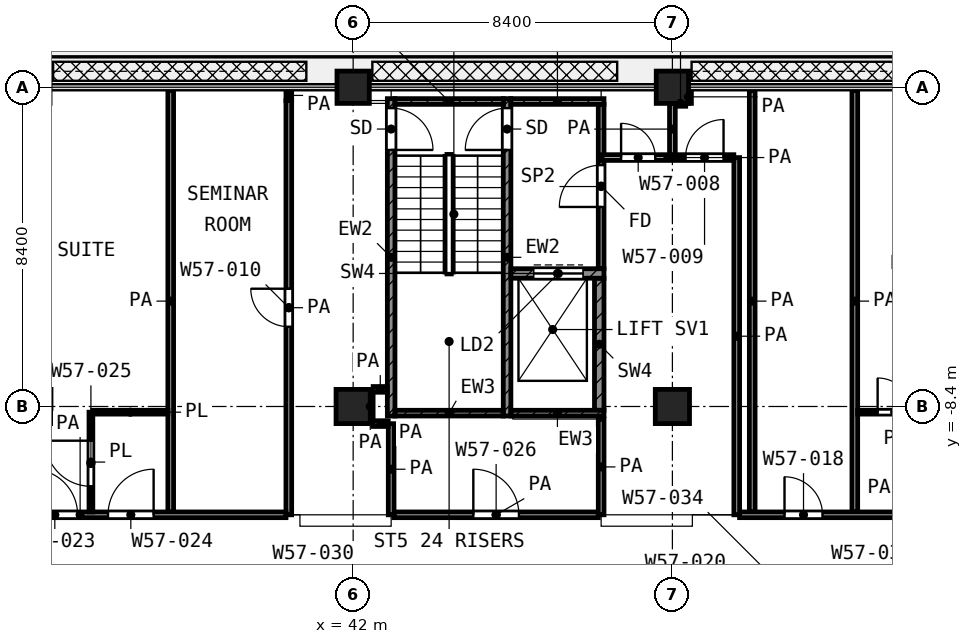
"""IFC4 building model, lengths in metres.
Left out: names, types, materials, properties, quantities, classifications, styles, units other than length and angle.
Written with IfcOpenShell. Run it as: python <this file> out.ifc"""

import sys

from ifc_helpers import new_model, si_unit, direction, frame, frame_2d, origin, origin_2d, place, context, subcontext, project, spatial, rectangle, extrude, element, fill, save


model = new_model("IFC4")
c1 = context("Model", 3, precision=1e-05, world=origin(), true_north=direction((0.0, 1.0)))
c2 = subcontext(c1, "Body", "Model", "MODEL_VIEW")
j1 = project(units=[si_unit("LENGTHUNIT", "METRE"), si_unit("PLANEANGLEUNIT", "RADIAN")], contexts=[c1])
p1 = place(None, origin())
s1 = spatial("IfcSite", under=j1, at=p1, CompositionType="ELEMENT")
p2 = place(p1, origin())
s2 = spatial("IfcBuilding", under=s1, at=p2, CompositionType="ELEMENT")
p3 = place(p2, frame((0.0, 0.0, 247.4)))
s3 = spatial("IfcBuildingStorey", under=s2, at=p3, CompositionType="ELEMENT", Elevation=247.4)
for number, where, z_axis, x_axis in (
    (1, (42.0, 0.0, 0.0), (0.0, 0.0, 1.0), (1.0, 0.0, 0.0)),
    (2, (50.4, 0.0, 0.0), (0.0, 0.0, 1.0), (1.0, 0.0, 0.0)),
):
    element("IfcColumn", number, at=place(p3, frame(where, z_axis=z_axis, x_axis=x_axis)), inside=s3, PredefinedType="COLUMN", context=c2, shape_type="SweptSolid", body=[
        extrude(rectangle(XDim=0.85, YDim=0.85, at=origin_2d()), origin(), (0.0, 0.0, 1.0), 4.2),
    ])
for number, where, z_axis, x_axis in (
    (3, (42.0, -8.4, 0.0), (0.0, 0.0, 1.0), (1.0, 0.0, 0.0)),
    (4, (50.4, -8.4, 0.0), (0.0, 0.0, 1.0), (1.0, 0.0, 0.0)),
):
    element("IfcColumn", number, at=place(p3, frame(where, z_axis=z_axis, x_axis=x_axis)), inside=s3, PredefinedType="COLUMN", context=c2, shape_type="SweptSolid", body=[
        extrude(rectangle(XDim=0.9, YDim=0.9, at=origin_2d()), origin(), (0.0, 0.0, 1.0), 4.2),
    ])
p4 = place(p3, frame((43.0, -8.65, 0.0), z_axis=(0.0, 0.0, 1.0), x_axis=(0.0, 1.0, 0.0)))
e5 = element("IfcWall", 5, at=p4, inside=s3, PredefinedType="SHEAR", context=c2, shape_type="SweptSolid", body=[
    extrude(rectangle(XDim=8.35, YDim=0.2, at=frame_2d((4.175, 0.0))), origin(), (0.0, 0.0, 1.0), 3.6),
])
p5 = place(p4, frame((7.0, 0.0, 0.0)))
e6 = element("IfcOpeningElement", 6, at=p5, cuts=e5, PredefinedType="OPENING", context=c2, shape_type="SweptSolid", body=[
    extrude(rectangle(XDim=1.1, YDim=2.1, at=frame_2d((0.55, 1.05))), frame((0.0, 0.11, 0.0), z_axis=(0.0, -1.0, 0.0), x_axis=(1.0, 0.0, 0.0)), (0.0, 0.0, 1.0), 0.22),
])
p6 = place(p3, frame((46.05, -8.65, 0.0), z_axis=(0.0, 0.0, 1.0), x_axis=(0.0, 1.0, 0.0)))
e7 = element("IfcWall", 7, at=p6, inside=s3, PredefinedType="SHEAR", context=c2, shape_type="SweptSolid", body=[
    extrude(rectangle(XDim=8.35, YDim=0.2, at=frame_2d((4.175, 0.0))), origin(), (0.0, 0.0, 1.0), 3.6),
])
p7 = place(p6, frame((7.0, 0.0, 0.0)))
e8 = element("IfcOpeningElement", 8, at=p7, cuts=e7, PredefinedType="OPENING", context=c2, shape_type="SweptSolid", body=[
    extrude(rectangle(XDim=1.1, YDim=2.1, at=frame_2d((0.55, 1.05))), frame((0.0, 0.11, 0.0), z_axis=(0.0, -1.0, 0.0), x_axis=(1.0, 0.0, 0.0)), (0.0, 0.0, 1.0), 0.22),
])
p8 = place(p3, frame((43.1, -0.375, 0.0), z_axis=(0.0, 0.0, 1.0), x_axis=(1.0, 0.0, 0.0)))
e9 = element("IfcWall", 9, at=p8, inside=s3, PredefinedType="SHEAR", context=c2, shape_type="SweptSolid", body=[
    extrude(rectangle(XDim=2.85, YDim=0.15, at=frame_2d((1.425, 0.0))), origin(), (0.0, 0.0, 1.0), 3.6),
])
p9 = place(p3, frame((46.15, -0.375, 0.0), z_axis=(0.0, 0.0, 1.0), x_axis=(1.0, 0.0, 0.0)))
e10 = element("IfcWall", 10, at=p9, inside=s3, PredefinedType="SHEAR", context=c2, shape_type="SweptSolid", body=[
    extrude(rectangle(XDim=2.45, YDim=0.15, at=frame_2d((1.225, 0.0))), origin(), (0.0, 0.0, 1.0), 3.6),
])
p10 = place(p3, frame((43.1, -8.575, 0.0), z_axis=(0.0, 0.0, 1.0), x_axis=(1.0, 0.0, 0.0)))
e11 = element("IfcWall", 11, at=p10, inside=s3, PredefinedType="SHEAR", context=c2, shape_type="SweptSolid", body=[
    extrude(rectangle(XDim=2.85, YDim=0.15, at=frame_2d((1.425, 0.0))), origin(), (0.0, 0.0, 1.0), 3.6),
])
p11 = place(p3, frame((46.15, -8.575, 0.0), z_axis=(0.0, 0.0, 1.0), x_axis=(1.0, 0.0, 0.0)))
e12 = element("IfcWall", 12, at=p11, inside=s3, PredefinedType="SHEAR", context=c2, shape_type="SweptSolid", body=[
    extrude(rectangle(XDim=2.45, YDim=0.15, at=frame_2d((1.225, 0.0))), origin(), (0.0, 0.0, 1.0), 3.6),
])
p12 = place(p3, frame((46.15, -4.9, 0.0), z_axis=(0.0, 0.0, 1.0), x_axis=(1.0, 0.0, 0.0)))
e13 = element("IfcWall", 13, at=p12, inside=s3, PredefinedType="SHEAR", context=c2, shape_type="SweptSolid", body=[
    extrude(rectangle(XDim=2.45, YDim=0.25, at=frame_2d((1.225, 0.0))), origin(), (0.0, 0.0, 1.0), 3.6),
])
p13 = place(p12, frame((0.6, 0.0, 0.0)))
e14 = element("IfcOpeningElement", 14, at=p13, cuts=e13, PredefinedType="OPENING", context=c2, shape_type="SweptSolid", body=[
    extrude(rectangle(XDim=1.3, YDim=2.1, at=frame_2d((0.65, 1.05))), frame((0.0, 0.135, 0.0), z_axis=(0.0, -1.0, 0.0), x_axis=(1.0, 0.0, 0.0)), (0.0, 0.0, 1.0), 0.27),
])
p14 = place(p3, frame((48.475, -8.5, 0.0), z_axis=(0.0, 0.0, 1.0), x_axis=(0.0, 1.0, 0.0)))
e15 = element("IfcWall", 15, at=p14, inside=s3, PredefinedType="SHEAR", context=c2, shape_type="SweptSolid", body=[
    extrude(rectangle(XDim=3.475, YDim=0.25, at=frame_2d((1.738, 0.0))), origin(), (0.0, 0.0, 1.0), 3.6),
])
p15 = place(p3, frame((48.525, -4.775, 0.0), z_axis=(0.0, 0.0, 1.0), x_axis=(0.0, 1.0, 0.0)))
e16 = element("IfcWall", 16, at=p15, inside=s3, PredefinedType="PARTITIONING", context=c2, shape_type="SweptSolid", body=[
    extrude(rectangle(XDim=4.325, YDim=0.15, at=frame_2d((2.163, 0.0))), origin(), (0.0, 0.0, 1.0), 3.6),
])
p16 = place(p15, frame((1.625, 0.0, 0.0)))
e17 = element("IfcOpeningElement", 17, at=p16, cuts=e16, PredefinedType="OPENING", context=c2, shape_type="SweptSolid", body=[
    extrude(rectangle(XDim=1.1, YDim=2.1, at=frame_2d((0.55, 1.05))), frame((0.0, 0.085, 0.0), z_axis=(0.0, -1.0, 0.0), x_axis=(1.0, 0.0, 0.0)), (0.0, 0.0, 1.0), 0.17),
])
p17 = place(p3, frame((35.15, -8.55, 0.0), z_axis=(0.0, 0.0, 1.0), x_axis=(1.0, 0.0, 0.0)))
e18 = element("IfcWall", 18, at=p17, inside=s3, PredefinedType="PARTITIONING", context=c2, shape_type="SweptSolid", body=[
    extrude(rectangle(XDim=1.975, YDim=0.1, at=frame_2d((0.988, 0.0))), origin(), (0.0, 0.0, 1.0), 3.6),
])
p18 = place(p3, frame((55.275, -8.55, 0.0), z_axis=(0.0, 0.0, 1.0), x_axis=(1.0, 0.0, 0.0)))
e19 = element("IfcWall", 19, at=p18, inside=s3, PredefinedType="PARTITIONING", context=c2, shape_type="SweptSolid", body=[
    extrude(rectangle(XDim=1.975, YDim=0.1, at=frame_2d((0.988, 0.0))), origin(), (0.0, 0.0, 1.0), 3.6),
])
p19 = place(p18, frame((0.525, 0.0, 0.0)))
e20 = element("IfcOpeningElement", 20, at=p19, cuts=e19, PredefinedType="OPENING", context=c2, shape_type="SweptSolid", body=[
    extrude(rectangle(XDim=0.9, YDim=2.1, at=frame_2d((0.45, 1.05))), frame((0.0, 0.06, 0.0), z_axis=(0.0, -1.0, 0.0), x_axis=(1.0, 0.0, 0.0)), (0.0, 0.0, 1.0), 0.12),
])
p20 = place(p3, frame((35.1, -11.175, 0.0), z_axis=(0.0, 0.0, 1.0), x_axis=(0.0, 1.0, 0.0)))
e21 = element("IfcWall", 21, at=p20, inside=s3, PredefinedType="PARTITIONING", context=c2, shape_type="SweptSolid", body=[
    extrude(rectangle(XDim=2.625, YDim=0.1, at=frame_2d((1.312, 0.0))), origin(), (0.0, 0.0, 1.0), 3.6),
])
p21 = place(p20, frame((0.675, 0.0, 0.0)))
e22 = element("IfcOpeningElement", 22, at=p21, cuts=e21, PredefinedType="OPENING", context=c2, shape_type="SweptSolid", body=[
    extrude(rectangle(XDim=1.2, YDim=2.1, at=frame_2d((0.6, 1.05))), frame((0.0, 0.06, 0.0), z_axis=(0.0, -1.0, 0.0), x_axis=(1.0, 0.0, 0.0)), (0.0, 0.0, 1.0), 0.12),
])
p22 = place(p3, frame((29.4, -11.25, 0.0), z_axis=(0.0, 0.0, 1.0), x_axis=(1.0, 0.0, 0.0)))
e23 = element("IfcWall", 23, at=p22, inside=s3, PredefinedType="PARTITIONING", context=c2, shape_type="SweptSolid", body=[
    extrude(rectangle(XDim=10.832, YDim=0.15, at=frame_2d((5.416, 0.0))), origin(), (0.0, 0.0, 1.0), 3.6),
])
p23 = place(p22, frame((2.625, 0.0, 0.0)))
e24 = element("IfcOpeningElement", 24, at=p23, cuts=e23, PredefinedType="OPENING", context=c2, shape_type="SweptSolid", body=[
    extrude(rectangle(XDim=1.2, YDim=2.1, at=frame_2d((0.6, 1.05))), frame((0.0, 0.085, 0.0), z_axis=(0.0, -1.0, 0.0), x_axis=(1.0, 0.0, 0.0)), (0.0, 0.0, 1.0), 0.17),
])
p24 = place(p22, frame((4.15, 0.0, 0.0)))
e25 = element("IfcOpeningElement", 25, at=p24, cuts=e23, PredefinedType="OPENING", context=c2, shape_type="SweptSolid", body=[
    extrude(rectangle(XDim=1.2, YDim=2.1, at=frame_2d((0.6, 1.05))), frame((0.0, 0.085, 0.0), z_axis=(0.0, -1.0, 0.0), x_axis=(1.0, 0.0, 0.0)), (0.0, 0.0, 1.0), 0.17),
])
p25 = place(p22, frame((6.15, 0.0, 0.0)))
e26 = element("IfcOpeningElement", 26, at=p25, cuts=e23, PredefinedType="OPENING", context=c2, shape_type="SweptSolid", body=[
    extrude(rectangle(XDim=1.2, YDim=2.1, at=frame_2d((0.6, 1.05))), frame((0.0, 0.085, 0.0), z_axis=(0.0, -1.0, 0.0), x_axis=(1.0, 0.0, 0.0)), (0.0, 0.0, 1.0), 0.17),
])
p26 = place(p3, frame((43.075, -11.25, 0.0), z_axis=(0.0, 0.0, 1.0), x_axis=(1.0, 0.0, 0.0)))
e27 = element("IfcWall", 27, at=p26, inside=s3, PredefinedType="PARTITIONING", context=c2, shape_type="SweptSolid", body=[
    extrude(rectangle(XDim=5.375, YDim=0.15, at=frame_2d((2.688, 0.0))), origin(), (0.0, 0.0, 1.0), 3.6),
])
p27 = place(p26, frame((2.087, 0.0, 0.0)))
e28 = element("IfcOpeningElement", 28, at=p27, cuts=e27, PredefinedType="OPENING", context=c2, shape_type="SweptSolid", body=[
    extrude(rectangle(XDim=1.2, YDim=2.1, at=frame_2d((0.6, 1.05))), frame((0.0, 0.085, 0.0), z_axis=(0.0, -1.0, 0.0), x_axis=(1.0, 0.0, 0.0)), (0.0, 0.0, 1.0), 0.17),
])
p28 = place(p3, frame((52.168, -11.25, 0.0), z_axis=(0.0, 0.0, 1.0), x_axis=(1.0, 0.0, 0.0)))
e29 = element("IfcWall", 29, at=p28, inside=s3, PredefinedType="PARTITIONING", context=c2, shape_type="SweptSolid", body=[
    extrude(rectangle(XDim=10.752, YDim=0.15, at=frame_2d((5.376, 0.0))), origin(), (0.0, 0.0, 1.0), 2.7),
])
p29 = place(p28, frame((5.332, 0.0, 0.0)))
e30 = element("IfcOpeningElement", 30, at=p29, cuts=e29, PredefinedType="OPENING", context=c2, shape_type="SweptSolid", body=[
    extrude(rectangle(XDim=1.1, YDim=2.1, at=frame_2d((0.55, 1.05))), frame((0.0, 0.085, 0.0), z_axis=(0.0, -1.0, 0.0), x_axis=(1.0, 0.0, 0.0)), (0.0, 0.0, 1.0), 0.17),
])
p30 = place(p28, frame((8.232, 0.0, 0.0)))
e31 = element("IfcOpeningElement", 31, at=p30, cuts=e29, PredefinedType="OPENING", context=c2, shape_type="SweptSolid", body=[
    extrude(rectangle(XDim=1.0, YDim=2.1, at=frame_2d((0.5, 1.05))), frame((0.0, 0.085, 0.0), z_axis=(0.0, -1.0, 0.0), x_axis=(1.0, 0.0, 0.0)), (0.0, 0.0, 1.0), 0.17),
])
p31 = place(p28, frame((1.182, 0.0, 0.0)))
e32 = element("IfcOpeningElement", 32, at=p31, cuts=e29, PredefinedType="OPENING", context=c2, shape_type="SweptSolid", body=[
    extrude(rectangle(XDim=1.0, YDim=2.1, at=frame_2d((0.5, 1.05))), frame((0.0, 0.085, 0.0), z_axis=(0.0, -1.0, 0.0), x_axis=(1.0, 0.0, 0.0)), (0.0, 0.0, 1.0), 0.17),
])
p32 = place(p3, frame((42.527, -8.85, 0.0), z_axis=(0.0, 0.0, 1.0), x_axis=(1.0, 0.0, 0.0)))
e33 = element("IfcWall", 33, at=p32, inside=s3, PredefinedType="PARTITIONING", context=c2, shape_type="SweptSolid", body=[
    extrude(rectangle(XDim=0.396, YDim=0.15, at=frame_2d((0.198, 0.0))), origin(), (0.0, 0.0, 1.0), 3.6),
])
p33 = place(p3, frame((42.527, -7.95, 0.0), z_axis=(0.0, 0.0, 1.0), x_axis=(1.0, 0.0, 0.0)))
e34 = element("IfcWall", 34, at=p33, inside=s3, PredefinedType="PARTITIONING", context=c2, shape_type="SweptSolid", body=[
    extrude(rectangle(XDim=0.373, YDim=0.15, at=frame_2d((0.187, 0.0))), origin(), (0.0, 0.0, 1.0), 3.6),
])
p34 = place(p3, frame((48.55, -1.85, 0.0), z_axis=(0.0, 0.0, 1.0), x_axis=(1.0, 0.0, 0.0)))
e35 = element("IfcWall", 35, at=p34, inside=s3, PredefinedType="PARTITIONING", context=c2, shape_type="SweptSolid", body=[
    extrude(rectangle(XDim=3.466, YDim=0.15, at=frame_2d((1.733, 0.0))), origin(), (0.0, 0.0, 1.0), 3.6),
])
p35 = place(p34, frame((0.5, 0.0, 0.0)))
e36 = element("IfcOpeningElement", 36, at=p35, cuts=e35, PredefinedType="OPENING", context=c2, shape_type="SweptSolid", body=[
    extrude(rectangle(XDim=0.9, YDim=2.1, at=frame_2d((0.45, 1.05))), frame((0.0, 0.085, 0.0), z_axis=(0.0, -1.0, 0.0), x_axis=(1.0, 0.0, 0.0)), (0.0, 0.0, 1.0), 0.17),
])
p36 = place(p34, frame((2.196, 0.0, 0.0)))
e37 = element("IfcOpeningElement", 37, at=p36, cuts=e35, PredefinedType="OPENING", context=c2, shape_type="SweptSolid", body=[
    extrude(rectangle(XDim=1.0, YDim=2.1, at=frame_2d((0.5, 1.05))), frame((0.0, 0.085, 0.0), z_axis=(0.0, -1.0, 0.0), x_axis=(1.0, 0.0, 0.0)), (0.0, 0.0, 1.0), 0.17),
])
p37 = place(p3, frame((50.477, -0.425, 0.0), z_axis=(0.0, 0.0, 1.0), x_axis=(1.0, 0.0, 0.0)))
e38 = element("IfcWall", 38, at=p37, inside=s3, PredefinedType="PARTITIONING", context=c2, shape_type="SweptSolid", body=[
    extrude(rectangle(XDim=0.273, YDim=0.15, at=frame_2d((0.136, 0.0))), origin(), (0.0, 0.0, 1.0), 3.6),
])
p38 = place(p3, frame((37.2, -11.175, 0.0), z_axis=(0.0, 0.0, 1.0), x_axis=(0.0, 1.0, 0.0)))
e39 = element("IfcWall", 39, at=p38, inside=s3, PredefinedType="PARTITIONING", context=c2, shape_type="SweptSolid", body=[
    extrude(rectangle(XDim=11.095, YDim=0.15, at=frame_2d((5.547, 0.0))), origin(), (0.0, 0.0, 1.0), 3.6),
])
p39 = place(p3, frame((40.307, -11.25, 0.0), z_axis=(0.0, 0.0, 1.0), x_axis=(0.0, 1.0, 0.0)))
e40 = element("IfcWall", 40, at=p39, inside=s3, PredefinedType="PARTITIONING", context=c2, shape_type="SweptSolid", body=[
    extrude(rectangle(XDim=10.898, YDim=0.15, at=frame_2d((5.449, 0.0))), origin(), (0.0, 0.0, 1.0), 3.6),
])
p40 = place(p39, frame((4.949, 0.0, 0.0)))
e41 = element("IfcOpeningElement", 41, at=p40, cuts=e40, PredefinedType="OPENING", context=c2, shape_type="SweptSolid", body=[
    extrude(rectangle(XDim=1.0, YDim=2.1, at=frame_2d((0.5, 1.05))), frame((0.0, 0.085, 0.0), z_axis=(0.0, -1.0, 0.0), x_axis=(1.0, 0.0, 0.0)), (0.0, 0.0, 1.0), 0.17),
])
p41 = place(p3, frame((40.307, -0.35, 0.0), z_axis=(0.0, 0.0, 1.0), x_axis=(0.0, 1.0, 0.0)))
e42 = element("IfcWall", 42, at=p41, inside=s3, PredefinedType="PARTITIONING", context=c2, shape_type="SweptSolid", body=[
    extrude(rectangle(XDim=0.27, YDim=0.15, at=frame_2d((0.135, 0.0))), origin(), (0.0, 0.0, 1.0), 3.6),
])
p42 = place(p3, frame((42.45, -8.849, 0.0), z_axis=(0.0, 0.0, 1.0), x_axis=(0.0, 1.0, 0.0)))
e43 = element("IfcWall", 43, at=p42, inside=s3, PredefinedType="PARTITIONING", context=c2, shape_type="SweptSolid", body=[
    extrude(rectangle(XDim=0.897, YDim=0.15, at=frame_2d((0.449, 0.0))), origin(), (0.0, 0.0, 1.0), 3.6),
])
p43 = place(p3, frame((43.0, -11.25, 0.0), z_axis=(0.0, 0.0, 1.0), x_axis=(0.0, 1.0, 0.0)))
e44 = element("IfcWall", 44, at=p43, inside=s3, PredefinedType="PARTITIONING", context=c2, shape_type="SweptSolid", body=[
    extrude(rectangle(XDim=2.398, YDim=0.15, at=frame_2d((1.199, 0.0))), origin(), (0.0, 0.0, 1.0), 3.6),
])
p44 = place(p3, frame((48.525, -11.25, 0.0), z_axis=(0.0, 0.0, 1.0), x_axis=(0.0, 1.0, 0.0)))
e45 = element("IfcWall", 45, at=p44, inside=s3, PredefinedType="PARTITIONING", context=c2, shape_type="SweptSolid", body=[
    extrude(rectangle(XDim=2.52, YDim=0.15, at=frame_2d((1.26, 0.0))), origin(), (0.0, 0.0, 1.0), 3.6),
])
p45 = place(p3, frame((50.4, -1.775, 0.0), z_axis=(0.0, 0.0, 1.0), x_axis=(0.0, 1.0, 0.0)))
e46 = element("IfcWall", 46, at=p45, inside=s3, PredefinedType="PARTITIONING", context=c2, shape_type="SweptSolid", body=[
    extrude(rectangle(XDim=1.348, YDim=0.15, at=frame_2d((0.674, 0.0))), origin(), (0.0, 0.0, 1.0), 3.6),
])
p46 = place(p3, frame((50.825, -0.425, 0.0), z_axis=(0.0, 0.0, 1.0), x_axis=(0.0, 1.0, 0.0)))
e47 = element("IfcWall", 47, at=p46, inside=s3, PredefinedType="PARTITIONING", context=c2, shape_type="SweptSolid", body=[
    extrude(rectangle(XDim=0.345, YDim=0.15, at=frame_2d((0.172, 0.0))), origin(), (0.0, 0.0, 1.0), 3.6),
])
p47 = place(p3, frame((52.093, -11.25, 0.0), z_axis=(0.0, 0.0, 1.0), x_axis=(0.0, 1.0, 0.0)))
e48 = element("IfcWall", 48, at=p47, inside=s3, PredefinedType="PARTITIONING", context=c2, shape_type="SweptSolid", body=[
    extrude(rectangle(XDim=9.399, YDim=0.15, at=frame_2d((4.699, 0.0))), origin(), (0.0, 0.0, 1.0), 3.6),
])
for number, where, z_axis, x_axis in (
    (49, (52.5, -11.175, 0.0), (0.0, 0.0, 1.0), (0.0, 1.0, 0.0)),
    (50, (55.2, -11.175, 0.0), (0.0, 0.0, 1.0), (0.0, 1.0, 0.0)),
):
    element("IfcWall", number, at=place(p3, frame(where, z_axis=z_axis, x_axis=x_axis)), inside=s3, PredefinedType="PARTITIONING", context=c2, shape_type="SweptSolid", body=[
        extrude(rectangle(XDim=11.095, YDim=0.15, at=frame_2d((5.547, 0.0))), origin(), (0.0, 0.0, 1.0), 3.6),
    ])
p48 = place(p5, frame((1.1, 0.0, 0.0), z_axis=(0.0, 0.0, 1.0), x_axis=(-1.0, 0.0, 0.0)))
e51 = element("IfcDoor", 51, at=p48, inside=s3, OperationType="SINGLE_SWING_LEFT", PredefinedType="DOOR", context=c2, shape_type="SweptSolid", body=[
    extrude(rectangle(XDim=1.1, YDim=2.1, at=frame_2d((0.55, 1.05))), frame((0.0, 0.025, 0.0), z_axis=(0.0, -1.0, 0.0), x_axis=(1.0, 0.0, 0.0)), (0.0, 0.0, 1.0), 0.05),
])
fill(e6, e51)
p49 = place(p7, origin())
e52 = element("IfcDoor", 52, at=p49, inside=s3, OperationType="SINGLE_SWING_LEFT", PredefinedType="DOOR", context=c2, shape_type="SweptSolid", body=[
    extrude(rectangle(XDim=1.1, YDim=2.1, at=frame_2d((0.55, 1.05))), frame((0.0, 0.025, 0.0), z_axis=(0.0, -1.0, 0.0), x_axis=(1.0, 0.0, 0.0)), (0.0, 0.0, 1.0), 0.05),
])
fill(e8, e52)
p50 = place(p13, origin())
e53 = element("IfcDoor", 53, at=p50, inside=s3, OperationType="DOUBLE_DOOR_SLIDING", PredefinedType="DOOR", context=c2, shape_type="SweptSolid", body=[
    extrude(rectangle(XDim=1.3, YDim=2.1, at=frame_2d((0.65, 1.05))), frame((0.0, 0.025, 0.0), z_axis=(0.0, -1.0, 0.0), x_axis=(1.0, 0.0, 0.0)), (0.0, 0.0, 1.0), 0.05),
])
fill(e14, e53)
p51 = place(p16, origin())
e54 = element("IfcDoor", 54, at=p51, inside=s3, OperationType="SINGLE_SWING_LEFT", PredefinedType="DOOR", context=c2, shape_type="SweptSolid", body=[
    extrude(rectangle(XDim=1.1, YDim=2.1, at=frame_2d((0.55, 1.05))), frame((0.0, 0.025, 0.0), z_axis=(0.0, -1.0, 0.0), x_axis=(1.0, 0.0, 0.0)), (0.0, 0.0, 1.0), 0.05),
])
fill(e17, e54)
p52 = place(p24, origin())
e55 = element("IfcDoor", 55, at=p52, inside=s3, OperationType="SINGLE_SWING_LEFT", PredefinedType="DOOR", context=c2, shape_type="SweptSolid", body=[
    extrude(rectangle(XDim=1.2, YDim=2.1, at=frame_2d((0.6, 1.05))), frame((0.0, 0.025, 0.0), z_axis=(0.0, -1.0, 0.0), x_axis=(1.0, 0.0, 0.0)), (0.0, 0.0, 1.0), 0.05),
])
fill(e25, e55)
p53 = place(p25, origin())
e56 = element("IfcDoor", 56, at=p53, inside=s3, OperationType="SINGLE_SWING_RIGHT", PredefinedType="DOOR", context=c2, shape_type="SweptSolid", body=[
    extrude(rectangle(XDim=1.2, YDim=2.1, at=frame_2d((0.6, 1.05))), frame((0.0, 0.025, 0.0), z_axis=(0.0, -1.0, 0.0), x_axis=(1.0, 0.0, 0.0)), (0.0, 0.0, 1.0), 0.05),
])
fill(e26, e56)
p54 = place(p21, origin())
e57 = element("IfcDoor", 57, at=p54, inside=s3, OperationType="SINGLE_SWING_RIGHT", PredefinedType="DOOR", context=c2, shape_type="SweptSolid", body=[
    extrude(rectangle(XDim=1.2, YDim=2.1, at=frame_2d((0.6, 1.05))), frame((0.0, 0.025, 0.0), z_axis=(0.0, -1.0, 0.0), x_axis=(1.0, 0.0, 0.0)), (0.0, 0.0, 1.0), 0.05),
])
fill(e22, e57)
p55 = place(p40, origin())
e58 = element("IfcDoor", 58, at=p55, inside=s3, OperationType="SINGLE_SWING_RIGHT", PredefinedType="DOOR", context=c2, shape_type="SweptSolid", body=[
    extrude(rectangle(XDim=1.0, YDim=2.1, at=frame_2d((0.5, 1.05))), frame((0.0, 0.025, 0.0), z_axis=(0.0, -1.0, 0.0), x_axis=(1.0, 0.0, 0.0)), (0.0, 0.0, 1.0), 0.05),
])
fill(e41, e58)
p56 = place(p27, origin())
e59 = element("IfcDoor", 59, at=p56, inside=s3, OperationType="SINGLE_SWING_LEFT", PredefinedType="DOOR", context=c2, shape_type="SweptSolid", body=[
    extrude(rectangle(XDim=1.2, YDim=2.1, at=frame_2d((0.6, 1.05))), frame((0.0, 0.025, 0.0), z_axis=(0.0, -1.0, 0.0), x_axis=(1.0, 0.0, 0.0)), (0.0, 0.0, 1.0), 0.05),
])
fill(e28, e59)
p57 = place(p19, origin())
e60 = element("IfcDoor", 60, at=p57, inside=s3, OperationType="SINGLE_SWING_LEFT", PredefinedType="DOOR", context=c2, shape_type="SweptSolid", body=[
    extrude(rectangle(XDim=0.9, YDim=2.1, at=frame_2d((0.45, 1.05))), frame((0.0, 0.025, 0.0), z_axis=(0.0, -1.0, 0.0), x_axis=(1.0, 0.0, 0.0)), (0.0, 0.0, 1.0), 0.05),
])
fill(e20, e60)
p58 = place(p35, origin())
e61 = element("IfcDoor", 61, at=p58, inside=s3, OperationType="SINGLE_SWING_LEFT", PredefinedType="DOOR", context=c2, shape_type="SweptSolid", body=[
    extrude(rectangle(XDim=0.9, YDim=2.1, at=frame_2d((0.45, 1.05))), frame((0.0, 0.025, 0.0), z_axis=(0.0, -1.0, 0.0), x_axis=(1.0, 0.0, 0.0)), (0.0, 0.0, 1.0), 0.05),
])
fill(e36, e61)
p59 = place(p36, origin())
e62 = element("IfcDoor", 62, at=p59, inside=s3, OperationType="SINGLE_SWING_RIGHT", PredefinedType="DOOR", context=c2, shape_type="SweptSolid", body=[
    extrude(rectangle(XDim=1.0, YDim=2.1, at=frame_2d((0.5, 1.05))), frame((0.0, 0.025, 0.0), z_axis=(0.0, -1.0, 0.0), x_axis=(1.0, 0.0, 0.0)), (0.0, 0.0, 1.0), 0.05),
])
fill(e37, e62)
p60 = place(p31, origin())
e63 = element("IfcDoor", 63, at=p60, inside=s3, OperationType="SINGLE_SWING_LEFT", PredefinedType="DOOR", context=c2, shape_type="SweptSolid", body=[
    extrude(rectangle(XDim=1.0, YDim=2.1, at=frame_2d((0.5, 1.05))), frame((0.0, 0.025, 0.0), z_axis=(0.0, -1.0, 0.0), x_axis=(1.0, 0.0, 0.0)), (0.0, 0.0, 1.0), 0.05),
])
fill(e32, e63)
save(model, sys.argv[1])
